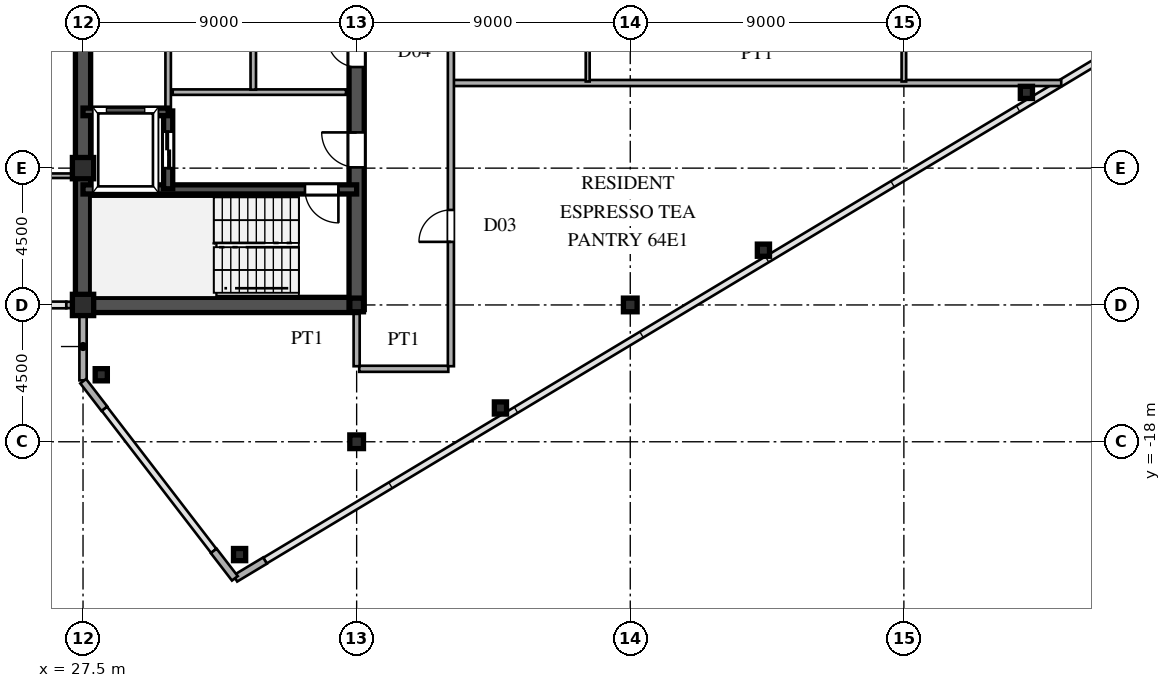
"""IFC4 building model, lengths in metres.
Left out: names, types, materials, properties, quantities, classifications, styles, units other than length and angle.
Written with IfcOpenShell. Run it as: python <this file> out.ifc"""

import sys

from ifc_helpers import new_model, si_unit, direction, frame, frame_2d, origin, origin_2d, place, context, subcontext, project, spatial, rectangle, hollow_rectangle, i_section, extrude, source, transform, mapped, element, fill, save


model = new_model("IFC4")
c1 = context("Model", 3, precision=1e-05, world=origin(), true_north=direction((0.0, 1.0)))
c2 = subcontext(c1, "Body", "Model", "MODEL_VIEW")
j1 = project(units=[si_unit("LENGTHUNIT", "METRE"), si_unit("PLANEANGLEUNIT", "RADIAN")], contexts=[c1])
p1 = place(None, origin())
s1 = spatial("IfcSite", under=j1, at=p1, CompositionType="ELEMENT")
p2 = place(p1, origin())
s2 = spatial("IfcBuilding", under=s1, at=p2, CompositionType="ELEMENT")
p3 = place(p2, frame((0.0, 0.0, 243.15)))
s3 = spatial("IfcBuildingStorey", under=s2, at=p3, CompositionType="ELEMENT", Elevation=243.15)
m1 = source(origin(), c2, "Body", "SweptSolid", [
    extrude(hollow_rectangle(XDim=0.7, YDim=0.7, WallThickness=0.03, at=origin_2d()), origin(), (0.0, 0.0, 1.0), 3.75),
])
for number, where, z_axis, x_axis in (
    (1, (27.5, -13.5, 0.0), (0.0, 0.0, 1.0), (1.0, 0.0, 0.0)),
    (2, (27.5, -9.0, 0.0), (0.0, 0.0, 1.0), (1.0, 0.0, 0.0)),
):
    element("IfcColumn", number, at=place(p3, frame(where, z_axis=z_axis, x_axis=x_axis)), inside=s3, PredefinedType="COLUMN", context=c2, shape_type="MappedRepresentation", body=[
        mapped(m1, transform((0.0, 0.0, 0.0), scale=1.0)),
    ])
m2 = source(origin(), c2, "Body", "SweptSolid", [
    extrude(i_section(OverallWidth=0.45, OverallDepth=0.45, WebThickness=0.016, FlangeThickness=0.025, at=origin_2d()), origin(), (0.0, 0.0, 1.0), 3.75),
])
for number, where, z_axis, x_axis in (
    (3, (36.5, -18.0, 0.0), (0.0, 0.0, 1.0), (1.0, 0.0, 0.0)),
    (4, (36.5, -13.5, 0.0), (0.0, 0.0, 1.0), (1.0, 0.0, 0.0)),
    (5, (45.5, -13.5, 0.0), (0.0, 0.0, 1.0), (1.0, 0.0, 0.0)),
):
    element("IfcColumn", number, at=place(p3, frame(where, z_axis=z_axis, x_axis=x_axis)), inside=s3, PredefinedType="COLUMN", context=c2, shape_type="MappedRepresentation", body=[
        mapped(m2, transform((0.0, 0.0, 0.0), scale=1.0)),
    ])
m3 = source(origin(), c2, "Body", "SweptSolid", [
    extrude(hollow_rectangle(XDim=0.4, YDim=0.4, WallThickness=0.016, at=origin_2d()), origin(), (0.0, 0.0, 1.0), 3.75),
])
for number, where, z_axis, x_axis in (
    (6, (32.65, -21.71, 0.0), (0.0, 0.0, 1.0), (1.0, 0.0, 0.0)),
    (7, (28.1, -15.796, 0.0), (0.0, 0.0, 1.0), (1.0, 0.0, 0.0)),
    (8, (41.23, -16.889, 0.0), (0.0, 0.0, 1.0), (1.0, 0.0, 0.0)),
    (9, (49.88, -11.699, 0.0), (0.0, 0.0, 1.0), (1.0, 0.0, 0.0)),
    (10, (58.53, -6.509, 0.0), (0.0, 0.0, 1.0), (1.0, 0.0, 0.0)),
):
    element("IfcColumn", number, at=place(p3, frame(where, z_axis=z_axis, x_axis=x_axis)), inside=s3, PredefinedType="COLUMN", context=c2, shape_type="MappedRepresentation", body=[
        mapped(m3, transform((0.0, 0.0, 0.0), scale=1.0)),
    ])
p4 = place(p3, frame((32.509, -22.495, 0.0), z_axis=(0.0, 0.0, 1.0), x_axis=(0.85743623509, 0.514590228002, 0.0)))
e11 = element("IfcWall", 11, at=p4, inside=s3, PredefinedType="SOLIDWALL", context=c2, shape_type="SweptSolid", body=[
    extrude(rectangle(XDim=1.14, YDim=0.24, at=frame_2d((0.57, 0.0))), origin(), (0.0, 0.0, 1.0), 3.53),
])
p5 = place(p3, frame((27.5, -15.98, 0.0), z_axis=(0.0, 0.0, 1.0), x_axis=(0.0, 1.0, 0.0)))
e12 = element("IfcWall", 12, at=p5, inside=s3, PredefinedType="SOLIDWALL", context=c2, shape_type="SweptSolid", body=[
    extrude(rectangle(XDim=1.605, YDim=0.24, at=frame_2d((0.803, 0.0))), origin(), (0.0, 0.0, 1.0), 3.53),
])
p6 = place(p3, frame((27.5, -14.375, 0.0), z_axis=(0.0, 0.0, 1.0), x_axis=(0.0, 1.0, 0.0)))
e13 = element("IfcWall", 13, at=p6, inside=s3, PredefinedType="SOLIDWALL", context=c2, shape_type="SweptSolid", body=[
    extrude(rectangle(XDim=0.62, YDim=0.24, at=frame_2d((0.31, 0.0))), origin(), (0.0, 0.0, 1.0), 3.03),
])
for number, where, z_axis, x_axis in (
    (14, (27.506, -16.008, 0.0), (0.0, 0.0, 1.0), (0.61, -0.793, 0.0)),
    (15, (31.799, -21.588, 0.0), (0.0, 0.0, 1.0), (0.61, -0.793, 0.0)),
):
    element("IfcWall", number, at=place(p3, frame(where, z_axis=z_axis, x_axis=x_axis)), inside=s3, PredefinedType="SOLIDWALL", context=c2, shape_type="SweptSolid", body=[
        extrude(rectangle(XDim=1.14, YDim=0.24, at=frame_2d((0.57, 0.0))), origin(), (0.0, 0.0, 1.0), 3.53),
    ])
p7 = place(p3, frame((26.95, -13.5, 0.0), z_axis=(0.0, 0.0, 1.0), x_axis=(1.0, 0.0, 0.0)))
e16 = element("IfcWall", 16, at=p7, inside=s3, PredefinedType="SOLIDWALL", context=c2, shape_type="SweptSolid", body=[
    extrude(rectangle(XDim=0.54, YDim=0.21, at=frame_2d((0.27, 0.0))), origin(), (0.0, 0.0, 1.0), 3.03),
])
p8 = place(p3, frame((27.5, -13.5, 0.0), z_axis=(0.0, 0.0, 1.0), x_axis=(0.0, 1.0, 0.0)))
e17 = element("IfcWall", 17, at=p8, inside=s3, PredefinedType="SHEAR", context=c2, shape_type="SweptSolid", body=[
    extrude(rectangle(XDim=12.2, YDim=0.5, at=frame_2d((6.1, 0.0))), origin(), (0.0, 0.0, 1.0), 3.53),
])
p9 = place(p3, frame((27.5, -13.5, 0.0), z_axis=(0.0, 0.0, 1.0), x_axis=(1.0, 0.0, 0.0)))
e18 = element("IfcWall", 18, at=p9, inside=s3, PredefinedType="SHEAR", context=c2, shape_type="SweptSolid", body=[
    extrude(rectangle(XDim=9.0, YDim=0.5, at=frame_2d((4.5, 0.0))), origin(), (0.0, 0.0, 1.0), 3.53),
])
p10 = place(p3, frame((36.5, -13.65, 0.0), z_axis=(0.0, 0.0, 1.0), x_axis=(0.0, 1.0, 0.0)))
e19 = element("IfcWall", 19, at=p10, inside=s3, PredefinedType="SHEAR", context=c2, shape_type="SweptSolid", body=[
    extrude(rectangle(XDim=7.15, YDim=0.5, at=frame_2d((3.575, 0.0))), origin(), (0.0, 0.0, 1.0), 3.53),
])
p11 = place(p10, frame((4.675, 0.0, 0.0)))
e20 = element("IfcOpeningElement", 20, at=p11, cuts=e19, PredefinedType="OPENING", context=c2, shape_type="SweptSolid", body=[
    extrude(rectangle(XDim=1.15, YDim=2.2, at=frame_2d((0.575, 1.1))), frame((0.0, 0.26, 0.0), z_axis=(0.0, -1.0, 0.0), x_axis=(1.0, 0.0, 0.0)), (0.0, 0.0, 1.0), 0.52),
])
p12 = place(p3, frame((36.5, -6.5, 0.0), z_axis=(0.0, 0.0, 1.0), x_axis=(0.0, 1.0, 0.0)))
e21 = element("IfcWall", 21, at=p12, inside=s3, PredefinedType="SHEAR", context=c2, shape_type="SweptSolid", body=[
    extrude(rectangle(XDim=2.6, YDim=0.5, at=frame_2d((1.3, 0.0))), origin(), (0.0, 0.0, 1.0), 3.53),
])
p13 = place(p12, frame((0.825, 0.0, 0.0)))
e22 = element("IfcOpeningElement", 22, at=p13, cuts=e21, PredefinedType="OPENING", context=c2, shape_type="SweptSolid", body=[
    extrude(rectangle(XDim=0.95, YDim=2.15, at=frame_2d((0.475, 1.075))), frame((0.0, 0.26, 0.0), z_axis=(0.0, -1.0, 0.0), x_axis=(1.0, 0.0, 0.0)), (0.0, 0.0, 1.0), 0.52),
])
p14 = place(p3, frame((27.5, -9.7, 0.0), z_axis=(0.0, 0.0, 1.0), x_axis=(1.0, 0.0, 0.0)))
e23 = element("IfcWall", 23, at=p14, inside=s3, PredefinedType="SHEAR", context=c2, shape_type="SweptSolid", body=[
    extrude(rectangle(XDim=9.0, YDim=0.3, at=frame_2d((4.5, 0.0))), origin(), (0.0, 0.0, 1.0), 3.53),
])
p15 = place(p14, frame((7.3, 0.0, 0.0)))
e24 = element("IfcOpeningElement", 24, at=p15, cuts=e23, PredefinedType="OPENING", context=c2, shape_type="SweptSolid", body=[
    extrude(rectangle(XDim=1.1, YDim=2.2, at=frame_2d((0.55, 1.1))), frame((0.0, 0.16, 0.0), z_axis=(0.0, -1.0, 0.0), x_axis=(1.0, 0.0, 0.0)), (0.0, 0.0, 1.0), 0.32),
])
p16 = place(p3, frame((27.5, -7.15, 0.0), z_axis=(0.0, 0.0, 1.0), x_axis=(1.0, 0.0, 0.0)))
e25 = element("IfcWall", 25, at=p16, inside=s3, PredefinedType="SHEAR", context=c2, shape_type="SweptSolid", body=[
    extrude(rectangle(XDim=2.8, YDim=0.25, at=frame_2d((1.4, 0.0))), origin(), (0.0, 0.0, 1.0), 3.53),
])
p17 = place(p3, frame((30.3, -9.68, 0.0), z_axis=(0.0, 0.0, 1.0), x_axis=(0.0, 1.0, 0.0)))
e26 = element("IfcWall", 26, at=p17, inside=s3, PredefinedType="SHEAR", context=c2, shape_type="SweptSolid", body=[
    extrude(rectangle(XDim=2.56, YDim=0.3, at=frame_2d((1.28, 0.0))), origin(), (0.0, 0.0, 1.0), 3.53),
])
p18 = place(p17, frame((0.68, 0.0, 0.0)))
e27 = element("IfcOpeningElement", 27, at=p18, cuts=e26, PredefinedType="OPENING", context=c2, shape_type="SweptSolid", body=[
    extrude(rectangle(XDim=1.2, YDim=2.25, at=frame_2d((0.6, 1.125))), frame((0.0, 0.16, 0.0), z_axis=(0.0, -1.0, 0.0), x_axis=(1.0, 0.0, 0.0)), (0.0, 0.0, 1.0), 0.32),
])
p19 = place(p3, frame((30.45, -6.5, 0.0), z_axis=(0.0, 0.0, 1.0), x_axis=(1.0, 0.0, 0.0)))
e28 = element("IfcWall", 28, at=p19, inside=s3, PredefinedType="PARTITIONING", context=c2, shape_type="SweptSolid", body=[
    extrude(rectangle(XDim=5.7, YDim=0.18, at=frame_2d((2.85, 0.0))), origin(), (0.0, 0.0, 1.0), 3.53),
])
p20 = place(p3, frame((33.1, -6.42, 0.0), z_axis=(0.0, 0.0, 1.0), x_axis=(0.0, 1.0, 0.0)))
e29 = element("IfcWall", 29, at=p20, inside=s3, PredefinedType="PARTITIONING", context=c2, shape_type="SweptSolid", body=[
    extrude(rectangle(XDim=5.04, YDim=0.18, at=frame_2d((2.52, 0.0))), origin(), (0.0, 0.0, 1.0), 3.53),
])
p21 = place(p3, frame((30.3, -7.12, 0.0), z_axis=(0.0, 0.0, 1.0), x_axis=(0.0, 1.0, 0.0)))
e30 = element("IfcWall", 30, at=p21, inside=s3, PredefinedType="PARTITIONING", context=c2, shape_type="SweptSolid", body=[
    extrude(rectangle(XDim=5.74, YDim=0.18, at=frame_2d((2.87, 0.0))), origin(), (0.0, 0.0, 1.0), 3.53),
])
p22 = place(p3, frame((36.585, -15.6, 0.0), z_axis=(0.0, 0.0, 1.0), x_axis=(1.0, 0.0, 0.0)))
e31 = element("IfcWall", 31, at=p22, inside=s3, PredefinedType="PARTITIONING", context=c2, shape_type="SweptSolid", body=[
    extrude(rectangle(XDim=2.93, YDim=0.2, at=frame_2d((1.465, 0.0))), origin(), (0.0, 0.0, 1.0), 3.53),
])
p23 = place(p3, frame((5.585, -9.25, 0.0), z_axis=(0.0, 0.0, 1.0), x_axis=(1.0, 0.0, 0.0)))
e32 = element("IfcWall", 32, at=p23, inside=s3, PredefinedType="PARTITIONING", context=c2, shape_type="SweptSolid", body=[
    extrude(rectangle(XDim=21.66, YDim=0.15, at=frame_2d((10.83, 0.0))), origin(), (0.0, 0.0, 1.0), 3.53),
])
p24 = place(p23, frame((3.94, 0.0, 0.0)))
e33 = element("IfcOpeningElement", 33, at=p24, cuts=e32, PredefinedType="OPENING", context=c2, shape_type="SweptSolid", body=[
    extrude(rectangle(XDim=0.95, YDim=2.15, at=frame_2d((0.475, 1.075))), frame((0.0, 0.085, 0.0), z_axis=(0.0, -1.0, 0.0), x_axis=(1.0, 0.0, 0.0)), (0.0, 0.0, 1.0), 0.17),
])
p25 = place(p23, frame((11.69, 0.0, 0.0)))
e34 = element("IfcOpeningElement", 34, at=p25, cuts=e32, PredefinedType="OPENING", context=c2, shape_type="SweptSolid", body=[
    extrude(rectangle(XDim=0.95, YDim=2.15, at=frame_2d((0.475, 1.075))), frame((0.0, 0.085, 0.0), z_axis=(0.0, -1.0, 0.0), x_axis=(1.0, 0.0, 0.0)), (0.0, 0.0, 1.0), 0.17),
])
p26 = place(p23, frame((18.19, 0.0, 0.0)))
e35 = element("IfcOpeningElement", 35, at=p26, cuts=e32, PredefinedType="OPENING", context=c2, shape_type="SweptSolid", body=[
    extrude(rectangle(XDim=0.95, YDim=2.15, at=frame_2d((0.475, 1.075))), frame((0.0, 0.085, 0.0), z_axis=(0.0, -1.0, 0.0), x_axis=(1.0, 0.0, 0.0)), (0.0, 0.0, 1.0), 0.17),
])
p27 = place(p3, frame((39.68, -6.2, 0.0), z_axis=(0.0, 0.0, 1.0), x_axis=(1.0, 0.0, 0.0)))
e36 = element("IfcWall", 36, at=p27, inside=s3, PredefinedType="PARTITIONING", context=c2, shape_type="SweptSolid", body=[
    extrude(rectangle(XDim=19.996, YDim=0.2, at=frame_2d((9.998, 0.0))), origin(), (0.0, 0.0, 1.0), 3.53),
])
p28 = place(p3, frame((36.5, -15.515, 0.0), z_axis=(0.0, 0.0, 1.0), x_axis=(0.0, 1.0, 0.0)))
e37 = element("IfcWall", 37, at=p28, inside=s3, PredefinedType="PARTITIONING", context=c2, shape_type="SweptSolid", body=[
    extrude(rectangle(XDim=1.76, YDim=0.2, at=frame_2d((0.88, 0.0))), origin(), (0.0, 0.0, 1.0), 2.93),
])
p29 = place(p3, frame((39.6, -15.515, 0.0), z_axis=(0.0, 0.0, 1.0), x_axis=(0.0, 1.0, 0.0)))
e38 = element("IfcWall", 38, at=p29, inside=s3, PredefinedType="PARTITIONING", context=c2, shape_type="SweptSolid", body=[
    extrude(rectangle(XDim=31.03, YDim=0.2, at=frame_2d((15.515, 0.0))), origin(), (0.0, 0.0, 1.0), 3.53),
])
p30 = place(p29, frame((4.09, 0.0, 0.0)))
e39 = element("IfcOpeningElement", 39, at=p30, cuts=e38, PredefinedType="OPENING", context=c2, shape_type="SweptSolid", body=[
    extrude(rectangle(XDim=1.05, YDim=2.25, at=frame_2d((0.525, 1.125))), frame((0.0, 0.11, 0.0), z_axis=(0.0, -1.0, 0.0), x_axis=(1.0, 0.0, 0.0)), (0.0, 0.0, 1.0), 0.22),
])
p31 = place(p29, frame((14.998, 0.0, 0.0)))
e40 = element("IfcOpeningElement", 40, at=p31, cuts=e38, PredefinedType="OPENING", context=c2, shape_type="SweptSolid", body=[
    extrude(rectangle(XDim=1.05, YDim=2.25, at=frame_2d((0.525, 1.125))), frame((0.0, 0.11, 0.0), z_axis=(0.0, -1.0, 0.0), x_axis=(1.0, 0.0, 0.0)), (0.0, 0.0, 1.0), 0.22),
])
p32 = place(p29, frame((26.09, 0.0, 0.0)))
e41 = element("IfcOpeningElement", 41, at=p32, cuts=e38, PredefinedType="OPENING", context=c2, shape_type="SweptSolid", body=[
    extrude(rectangle(XDim=1.05, YDim=2.25, at=frame_2d((0.525, 1.125))), frame((0.0, 0.11, 0.0), z_axis=(0.0, -1.0, 0.0), x_axis=(1.0, 0.0, 0.0)), (0.0, 0.0, 1.0), 0.22),
])
p33 = place(p3, frame((44.1, -6.15, 0.0), z_axis=(0.0, 0.0, 1.0), x_axis=(0.0, 1.0, 0.0)))
e42 = element("IfcWall", 42, at=p33, inside=s3, PredefinedType="PARTITIONING", context=c2, shape_type="SweptSolid", body=[
    extrude(rectangle(XDim=3.354, YDim=0.13, at=frame_2d((1.677, 0.0))), origin(), (0.0, 0.0, 1.0), 3.53),
])
p34 = place(p3, frame((54.5, -6.15, 0.0), z_axis=(0.0, 0.0, 1.0), x_axis=(0.0, 1.0, 0.0)))
e43 = element("IfcWall", 43, at=p34, inside=s3, PredefinedType="PARTITIONING", context=c2, shape_type="SweptSolid", body=[
    extrude(rectangle(XDim=12.7, YDim=0.15, at=frame_2d((6.35, 0.0))), origin(), (0.0, 0.0, 1.0), 2.93),
])
p35 = place(p34, frame((5.875, 0.0, 0.0)))
e44 = element("IfcOpeningElement", 44, at=p35, cuts=e43, PredefinedType="OPENING", context=c2, shape_type="SweptSolid", body=[
    extrude(rectangle(XDim=0.95, YDim=2.15, at=frame_2d((0.475, 1.075))), frame((0.0, 0.085, 0.0), z_axis=(0.0, -1.0, 0.0), x_axis=(1.0, 0.0, 0.0)), (0.0, 0.0, 1.0), 0.17),
])
m4 = source(origin(), c2, "Body", "SweptSolid", [
    extrude(rectangle(XDim=1.15, YDim=2.2, at=frame_2d((0.575, 1.1))), frame((0.0, 0.025, 0.0), z_axis=(0.0, -1.0, 0.0), x_axis=(1.0, 0.0, 0.0)), (0.0, 0.0, 1.0), 0.05),
])
p36 = place(p11, origin())
e45 = element("IfcDoor", 45, at=p36, inside=s3, OperationType="SINGLE_SWING_RIGHT", PredefinedType="DOOR", context=c2, shape_type="MappedRepresentation", body=[
    mapped(m4, transform((0.0, 0.0, 0.0), scale=1.0)),
])
fill(e20, e45)
m5 = source(origin(), c2, "Body", "SweptSolid", [
    extrude(rectangle(XDim=0.95, YDim=2.15, at=frame_2d((0.475, 1.075))), frame((0.0, 0.025, 0.0), z_axis=(0.0, -1.0, 0.0), x_axis=(1.0, 0.0, 0.0)), (0.0, 0.0, 1.0), 0.05),
])
p37 = place(p13, origin())
e46 = element("IfcDoor", 46, at=p37, inside=s3, OperationType="SINGLE_SWING_RIGHT", PredefinedType="DOOR", context=c2, shape_type="MappedRepresentation", body=[
    mapped(m5, transform((0.0, 0.0, 0.0), scale=1.0)),
])
fill(e22, e46)
m6 = source(origin(), c2, "Body", "SweptSolid", [
    extrude(rectangle(XDim=1.1, YDim=2.2, at=frame_2d((0.55, 1.1))), frame((0.0, 0.025, 0.0), z_axis=(0.0, -1.0, 0.0), x_axis=(1.0, 0.0, 0.0)), (0.0, 0.0, 1.0), 0.05),
])
p38 = place(p15, frame((1.1, 0.0, 0.0), z_axis=(0.0, 0.0, 1.0), x_axis=(-1.0, 0.0, 0.0)))
e47 = element("IfcDoor", 47, at=p38, inside=s3, OperationType="SINGLE_SWING_RIGHT", PredefinedType="DOOR", context=c2, shape_type="MappedRepresentation", body=[
    mapped(m6, transform((0.0, 0.0, 0.0), scale=1.0)),
])
fill(e24, e47)
m7 = source(origin(), c2, "Body", "SweptSolid", [
    extrude(rectangle(XDim=1.2, YDim=2.25, at=frame_2d((0.6, 1.125))), frame((0.0, 0.025, 0.0), z_axis=(0.0, -1.0, 0.0), x_axis=(1.0, 0.0, 0.0)), (0.0, 0.0, 1.0), 0.05),
])
p39 = place(p18, origin())
e48 = element("IfcDoor", 48, at=p39, inside=s3, OperationType="DOUBLE_DOOR_SLIDING", PredefinedType="DOOR", context=c2, shape_type="MappedRepresentation", body=[
    mapped(m7, transform((0.0, 0.0, 0.0), scale=1.0)),
])
fill(e27, e48)
m8 = source(origin(), c2, "Body", "SweptSolid", [
    extrude(rectangle(XDim=1.05, YDim=2.25, at=frame_2d((0.525, 1.125))), frame((0.0, 0.025, 0.0), z_axis=(0.0, -1.0, 0.0), x_axis=(1.0, 0.0, 0.0)), (0.0, 0.0, 1.0), 0.05),
])
p40 = place(p30, origin())
e49 = element("IfcDoor", 49, at=p40, inside=s3, OperationType="SINGLE_SWING_LEFT", PredefinedType="DOOR", context=c2, shape_type="MappedRepresentation", body=[
    mapped(m8, transform((0.0, 0.0, 0.0), scale=1.0)),
])
fill(e39, e49)
save(model, sys.argv[1])
